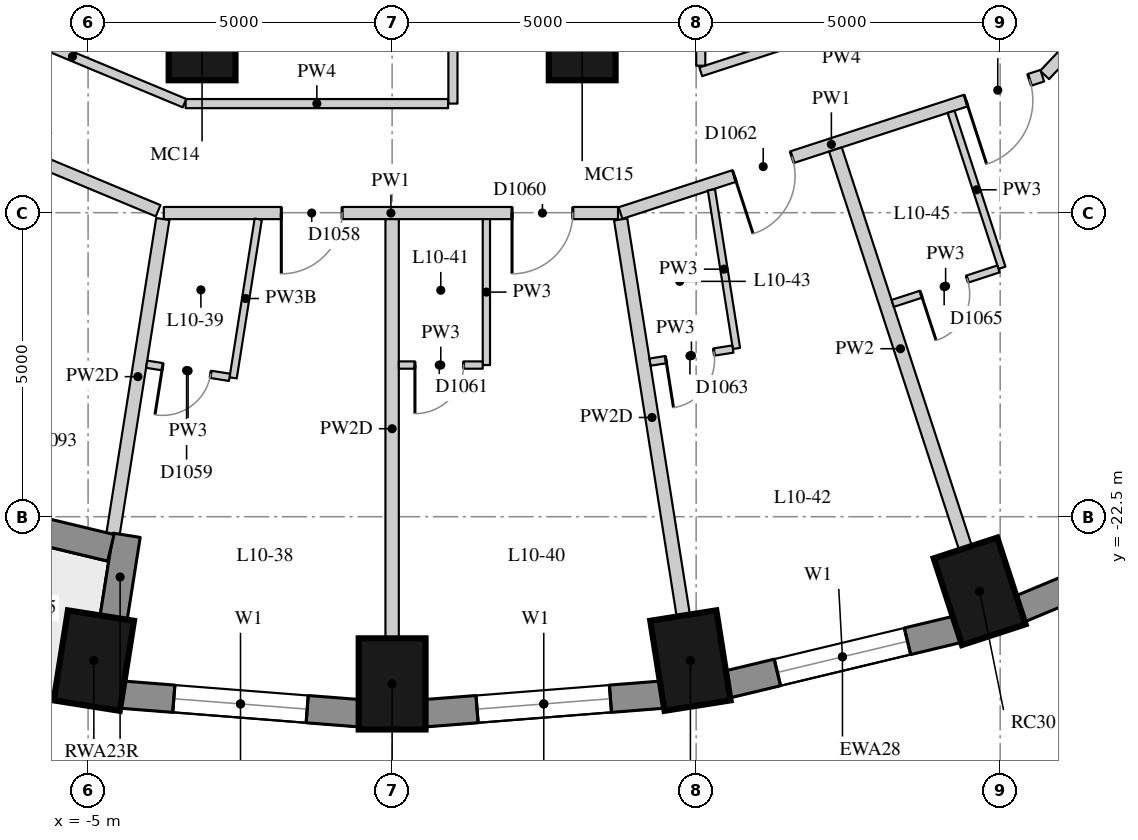
"""IFC4 building model, lengths in metres.
Left out: names, types, materials, properties, quantities, classifications, styles, units other than length and angle.
Written with IfcOpenShell. Run it as: python <this file> out.ifc"""

import sys

from ifc_helpers import new_model, si_unit, direction, frame, frame_2d, origin, origin_2d, place, context, subcontext, project, spatial, rectangle, extrude, element, fill, save


model = new_model("IFC4")
c1 = context("Model", 3, precision=1e-05, world=origin(), true_north=direction((0.0, 1.0)))
c2 = subcontext(c1, "Body", "Model", "MODEL_VIEW")
j1 = project(units=[si_unit("LENGTHUNIT", "METRE"), si_unit("PLANEANGLEUNIT", "RADIAN")], contexts=[c1])
p1 = place(None, origin())
s1 = spatial("IfcSite", under=j1, at=p1, CompositionType="ELEMENT")
p2 = place(p1, origin())
s2 = spatial("IfcBuilding", under=s1, at=p2, CompositionType="ELEMENT")
p3 = place(p2, frame((0.0, 0.0, 41.5)))
s3 = spatial("IfcBuildingStorey", under=s2, at=p3, CompositionType="ELEMENT", Elevation=41.5)
for number, where, z_axis, x_axis in (
    (1, (-4.906, -24.866, 0.0), (0.0, 0.0, 1.0), (-0.156, -0.988, 0.0)),
    (2, (0.0, -25.25, 0.0), (0.0, 0.0, 1.0), (0.0, -1.0, 0.0)),
    (3, (4.906, -24.866, 0.0), (0.0, 0.0, 1.0), (0.156, -0.988, 0.0)),
    (4, (9.662, -23.727, 0.0), (0.0, 0.0, 1.0), (0.31, -0.951, 0.0)),
):
    element("IfcColumn", number, at=place(p3, frame(where, z_axis=z_axis, x_axis=x_axis)), inside=s3, PredefinedType="COLUMN", context=c2, shape_type="SweptSolid", body=[
        extrude(rectangle(XDim=1.5, YDim=1.1, at=origin_2d()), origin(), (0.0, 0.0, 1.0), 3.3),
    ])
for number, where, z_axis, x_axis in (
    (5, (-3.126, -14.772, 0.0), (0.0, 0.0, 1.0), (1.0, 0.0, 0.0)),
    (6, (3.126, -14.772, 0.0), (0.0, 0.0, 1.0), (1.0, 0.0, 0.0)),
):
    element("IfcColumn", number, at=place(p3, frame(where, z_axis=z_axis, x_axis=x_axis)), inside=s3, PredefinedType="COLUMN", context=c2, shape_type="SweptSolid", body=[
        extrude(rectangle(XDim=1.1, YDim=1.1, at=origin_2d()), origin(), (0.0, 0.0, 1.0), 3.3),
    ])
p4 = place(p3, frame((-4.457, -25.426, 0.0), z_axis=(0.0, 0.0, 1.0), x_axis=(0.996955972145, -0.077966592873, 0.0)))
e7 = element("IfcWall", 7, at=p4, inside=s3, PredefinedType="SOLIDWALL", context=c2, shape_type="SweptSolid", body=[
    extrude(rectangle(XDim=3.939, YDim=0.45, at=frame_2d((1.97, 0.0))), origin(), (0.0, 0.0, 1.0), 3.02),
])
p5 = place(p4, frame((0.87, 0.0, 0.4)))
e8 = element("IfcOpeningElement", 8, at=p5, cuts=e7, PredefinedType="OPENING", context=c2, shape_type="SweptSolid", body=[
    extrude(rectangle(XDim=2.2, YDim=1.75, at=frame_2d((1.1, 0.875))), frame((0.0, 0.235, 0.0), z_axis=(0.0, -1.0, 0.0), x_axis=(1.0, 0.0, 0.0)), (0.0, 0.0, 1.0), 0.47),
])
p6 = place(p3, frame((0.53, -25.733, 0.0), z_axis=(0.0, 0.0, 1.0), x_axis=(0.996955972145, 0.077966592873, 0.0)))
e9 = element("IfcWall", 9, at=p6, inside=s3, PredefinedType="SOLIDWALL", context=c2, shape_type="SweptSolid", body=[
    extrude(rectangle(XDim=3.939, YDim=0.45, at=frame_2d((1.97, 0.0))), origin(), (0.0, 0.0, 1.0), 3.02),
])
p7 = place(p6, frame((0.87, 0.0, 0.4)))
e10 = element("IfcOpeningElement", 10, at=p7, cuts=e9, PredefinedType="OPENING", context=c2, shape_type="SweptSolid", body=[
    extrude(rectangle(XDim=2.2, YDim=1.75, at=frame_2d((1.1, 0.875))), frame((0.0, 0.235, 0.0), z_axis=(0.0, -1.0, 0.0), x_axis=(1.0, 0.0, 0.0)), (0.0, 0.0, 1.0), 0.47),
])
p8 = place(p3, frame((5.504, -25.26, 0.0), z_axis=(0.0, 0.0, 1.0), x_axis=(0.972496561493, 0.232917233979, 0.0)))
e11 = element("IfcWall", 11, at=p8, inside=s3, PredefinedType="SOLIDWALL", context=c2, shape_type="SweptSolid", body=[
    extrude(rectangle(XDim=3.911, YDim=0.45, at=frame_2d((1.956, 0.0))), origin(), (0.0, 0.0, 1.0), 3.02),
])
p9 = place(p8, frame((0.855, 0.0, 0.4)))
e12 = element("IfcOpeningElement", 12, at=p9, cuts=e11, PredefinedType="OPENING", context=c2, shape_type="SweptSolid", body=[
    extrude(rectangle(XDim=2.2, YDim=1.75, at=frame_2d((1.1, 0.875))), frame((0.0, 0.235, 0.0), z_axis=(0.0, -1.0, 0.0), x_axis=(1.0, 0.0, 0.0)), (0.0, 0.0, 1.0), 0.47),
])
p10 = place(p3, frame((10.315, -24.021, 0.0), z_axis=(0.0, 0.0, 1.0), x_axis=(0.923031964282, 0.384723267966, 0.0)))
e13 = element("IfcWall", 13, at=p10, inside=s3, PredefinedType="SOLIDWALL", context=c2, shape_type="SweptSolid", body=[
    extrude(rectangle(XDim=3.856, YDim=0.45, at=frame_2d((1.928, 0.0))), origin(), (0.0, 0.0, 1.0), 3.02),
])
p11 = place(p10, frame((0.828, 0.0, 0.4)))
e14 = element("IfcOpeningElement", 14, at=p11, cuts=e13, PredefinedType="OPENING", context=c2, shape_type="SweptSolid", body=[
    extrude(rectangle(XDim=2.2, YDim=1.75, at=frame_2d((1.1, 0.875))), frame((0.0, 0.235, 0.0), z_axis=(0.0, -1.0, 0.0), x_axis=(1.0, 0.0, 0.0)), (0.0, 0.0, 1.0), 0.47),
])
p12 = place(p3, frame((-4.583, -24.178, 0.0), z_axis=(0.0, 0.0, 1.0), x_axis=(0.156133927791, 0.98773589415, 0.0)))
e15 = element("IfcWall", 15, at=p12, inside=s3, PredefinedType="SOLIDWALL", context=c2, shape_type="SweptSolid", body=[
    extrude(rectangle(XDim=1.39, YDim=0.45, at=frame_2d((0.695, 0.0))), origin(), (0.0, 0.0, 1.0), 2.47),
])
p13 = place(p3, frame((-9.122, -21.932, 0.0), z_axis=(0.0, 0.0, 1.0), x_axis=(0.972346547441, -0.233542697764, 0.0)))
e16 = element("IfcWall", 16, at=p13, inside=s3, PredefinedType="SOLIDWALL", context=c2, shape_type="SweptSolid", body=[
    extrude(rectangle(XDim=4.624, YDim=0.45, at=frame_2d((2.312, 0.0))), origin(), (0.0, 0.0, 1.0), 3.02),
])
p14 = place(p13, frame((1.237, 0.0, 0.4)))
e17 = element("IfcOpeningElement", 17, at=p14, cuts=e16, PredefinedType="OPENING", context=c2, shape_type="SweptSolid", body=[
    extrude(rectangle(XDim=1.0, YDim=1.75, at=frame_2d((0.5, 0.875))), frame((0.0, 0.235, 0.0), z_axis=(0.0, -1.0, 0.0), x_axis=(1.0, 0.0, 0.0)), (0.0, 0.0, 1.0), 0.47),
])
p15 = place(p13, frame((2.387, 0.0, 0.0)))
e18 = element("IfcOpeningElement", 18, at=p15, cuts=e16, PredefinedType="OPENING", context=c2, shape_type="SweptSolid", body=[
    extrude(rectangle(XDim=1.0, YDim=2.15, at=frame_2d((0.5, 1.075))), frame((0.0, 0.235, 0.0), z_axis=(0.0, -1.0, 0.0), x_axis=(1.0, 0.0, 0.0)), (0.0, 0.0, 1.0), 0.47),
])
p16 = place(p3, frame((12.034, -13.858, 0.0), z_axis=(0.0, 0.0, 1.0), x_axis=(-0.687458821662, -0.726223359938, 0.0)))
e19 = element("IfcWall", 19, at=p16, inside=s3, PredefinedType="PARTITIONING", context=c2, shape_type="SweptSolid", body=[
    extrude(rectangle(XDim=1.896, YDim=0.2, at=frame_2d((0.948, 0.0))), origin(), (0.0, 0.0, 1.0), 3.02),
])
p17 = place(p3, frame((10.692, -15.247, 0.0), z_axis=(0.0, 0.0, 1.0), x_axis=(-0.950852414815, -0.309644449718, 0.0)))
e20 = element("IfcWall", 20, at=p17, inside=s3, PredefinedType="PARTITIONING", context=c2, shape_type="SweptSolid", body=[
    extrude(rectangle(XDim=7.296, YDim=0.2, at=frame_2d((3.648, 0.0))), origin(), (0.0, 0.0, 1.0), 3.02),
])
p18 = place(p17, frame((4.327, 0.0, 0.0)))
e21 = element("IfcOpeningElement", 21, at=p18, cuts=e20, PredefinedType="OPENING", context=c2, shape_type="SweptSolid", body=[
    extrude(rectangle(XDim=1.0, YDim=2.1, at=frame_2d((0.5, 1.05))), frame((0.0, 0.11, 0.0), z_axis=(0.0, -1.0, 0.0), x_axis=(1.0, 0.0, 0.0)), (0.0, 0.0, 1.0), 0.22),
])
p19 = place(p17, frame((0.22, 0.0, 0.0)))
e22 = element("IfcOpeningElement", 22, at=p19, cuts=e20, PredefinedType="OPENING", context=c2, shape_type="SweptSolid", body=[
    extrude(rectangle(XDim=1.1, YDim=2.1, at=frame_2d((0.55, 1.05))), frame((0.0, 0.11, 0.0), z_axis=(0.0, -1.0, 0.0), x_axis=(1.0, 0.0, 0.0)), (0.0, 0.0, 1.0), 0.22),
])
p20 = place(p3, frame((3.715, -17.506, 0.0), z_axis=(0.0, 0.0, 1.0), x_axis=(-1.0, 0.0, 0.0)))
e23 = element("IfcWall", 23, at=p20, inside=s3, PredefinedType="PARTITIONING", context=c2, shape_type="SweptSolid", body=[
    extrude(rectangle(XDim=7.471, YDim=0.2, at=frame_2d((3.735, 0.0))), origin(), (0.0, 0.0, 1.0), 3.02),
])
p21 = place(p20, frame((4.538, 0.0, 0.0)))
e24 = element("IfcOpeningElement", 24, at=p21, cuts=e23, PredefinedType="OPENING", context=c2, shape_type="SweptSolid", body=[
    extrude(rectangle(XDim=1.0, YDim=2.1, at=frame_2d((0.5, 1.05))), frame((0.0, 0.11, 0.0), z_axis=(0.0, -1.0, 0.0), x_axis=(1.0, 0.0, 0.0)), (0.0, 0.0, 1.0), 0.22),
])
p22 = place(p20, frame((0.743, 0.0, 0.0)))
e25 = element("IfcOpeningElement", 25, at=p22, cuts=e23, PredefinedType="OPENING", context=c2, shape_type="SweptSolid", body=[
    extrude(rectangle(XDim=1.0, YDim=2.1, at=frame_2d((0.5, 1.05))), frame((0.0, 0.11, 0.0), z_axis=(0.0, -1.0, 0.0), x_axis=(1.0, 0.0, 0.0)), (0.0, 0.0, 1.0), 0.22),
])
p23 = place(p3, frame((-3.848, -17.468, 0.0), z_axis=(0.0, 0.0, 1.0), x_axis=(-0.923248226412, 0.384203998454, 0.0)))
e26 = element("IfcWall", 26, at=p23, inside=s3, PredefinedType="PARTITIONING", context=c2, shape_type="SweptSolid", body=[
    extrude(rectangle(XDim=4.341, YDim=0.2, at=frame_2d((2.17, 0.0))), origin(), (0.0, 0.0, 1.0), 3.02),
])
p24 = place(p3, frame((1.0, -9.15, 0.0), z_axis=(0.0, 0.0, 1.0), x_axis=(0.0, -1.0, 0.0)))
e27 = element("IfcWall", 27, at=p24, inside=s3, PredefinedType="PARTITIONING", context=c2, shape_type="SweptSolid", body=[
    extrude(rectangle(XDim=6.556, YDim=0.15, at=frame_2d((3.278, 0.0))), origin(), (0.0, 0.0, 1.0), 2.47),
])
p25 = place(p24, frame((2.828, 0.0, 0.0)))
e28 = element("IfcOpeningElement", 28, at=p25, cuts=e27, PredefinedType="OPENING", context=c2, shape_type="SweptSolid", body=[
    extrude(rectangle(XDim=0.9, YDim=2.1, at=frame_2d((0.45, 1.05))), frame((0.0, 0.085, 0.0), z_axis=(0.0, -1.0, 0.0), x_axis=(1.0, 0.0, 0.0)), (0.0, 0.0, 1.0), 0.17),
])
p26 = place(p3, frame((0.92, -15.706, 0.0), z_axis=(0.0, 0.0, 1.0), x_axis=(-1.0, 0.0, 0.0)))
e29 = element("IfcWall", 29, at=p26, inside=s3, PredefinedType="PARTITIONING", context=c2, shape_type="SweptSolid", body=[
    extrude(rectangle(XDim=4.316, YDim=0.15, at=frame_2d((2.158, 0.0))), origin(), (0.0, 0.0, 1.0), 3.02),
])
p27 = place(p3, frame((-3.415, -15.698, 0.0), z_axis=(0.0, 0.0, 1.0), x_axis=(-0.923293917367, 0.38409418396, 0.0)))
e30 = element("IfcWall", 30, at=p27, inside=s3, PredefinedType="PARTITIONING", context=c2, shape_type="SweptSolid", body=[
    extrude(rectangle(XDim=3.992, YDim=0.15, at=frame_2d((1.996, 0.0))), origin(), (0.0, 0.0, 1.0), 2.57),
])
p28 = place(p3, frame((9.7, -13.677, 0.0), z_axis=(0.0, 0.0, 1.0), x_axis=(-0.950854246358, -0.309638825381, 0.0)))
e31 = element("IfcWall", 31, at=p28, inside=s3, PredefinedType="PARTITIONING", context=c2, shape_type="SweptSolid", body=[
    extrude(rectangle(XDim=4.863, YDim=0.15, at=frame_2d((2.432, 0.0))), origin(), (0.0, 0.0, 1.0), 3.02),
])
p29 = place(p28, frame((1.878, 0.0, 0.0)))
e32 = element("IfcOpeningElement", 32, at=p29, cuts=e31, PredefinedType="OPENING", context=c2, shape_type="SweptSolid", body=[
    extrude(rectangle(XDim=0.9, YDim=2.1, at=frame_2d((0.45, 1.05))), frame((0.0, 0.085, 0.0), z_axis=(0.0, -1.0, 0.0), x_axis=(1.0, 0.0, 0.0)), (0.0, 0.0, 1.0), 0.17),
])
p30 = place(p3, frame((5.076, -15.083, 0.0), z_axis=(0.0, 0.0, 1.0), x_axis=(0.0, 1.0, 0.0)))
e33 = element("IfcWall", 33, at=p30, inside=s3, PredefinedType="PARTITIONING", context=c2, shape_type="SweptSolid", body=[
    extrude(rectangle(XDim=0.86, YDim=0.15, at=frame_2d((0.43, 0.0))), origin(), (0.0, 0.0, 1.0), 3.02),
])
p31 = place(p3, frame((-4.591, -22.789, 0.0), z_axis=(0.0, 0.0, 1.0), x_axis=(0.156110671429, 0.987739570062, 0.0)))
e34 = element("IfcWall", 34, at=p31, inside=s3, PredefinedType="PARTITIONING", context=c2, shape_type="SweptSolid", body=[
    extrude(rectangle(XDim=5.249, YDim=0.22, at=frame_2d((2.624, 0.0))), origin(), (0.0, 0.0, 1.0), 2.47),
])
p32 = place(p3, frame((0.0, -24.5, 0.0), z_axis=(0.0, 0.0, 1.0), x_axis=(0.0, 1.0, 0.0)))
e35 = element("IfcWall", 35, at=p32, inside=s3, PredefinedType="PARTITIONING", context=c2, shape_type="SweptSolid", body=[
    extrude(rectangle(XDim=6.894, YDim=0.22, at=frame_2d((3.447, 0.0))), origin(), (0.0, 0.0, 1.0), 2.47),
])
p33 = place(p3, frame((4.788, -24.125, 0.0), z_axis=(0.0, 0.0, 1.0), x_axis=(-0.156122228938, 0.987737743347, 0.0)))
e36 = element("IfcWall", 36, at=p33, inside=s3, PredefinedType="PARTITIONING", context=c2, shape_type="SweptSolid", body=[
    extrude(rectangle(XDim=6.596, YDim=0.22, at=frame_2d((3.298, 0.0))), origin(), (0.0, 0.0, 1.0), 2.47),
])
p34 = place(p3, frame((9.429, -23.014, 0.0), z_axis=(0.0, 0.0, 1.0), x_axis=(-0.310230029144, 0.950661521793, 0.0)))
e37 = element("IfcWall", 37, at=p34, inside=s3, PredefinedType="PARTITIONING", context=c2, shape_type="SweptSolid", body=[
    extrude(rectangle(XDim=6.895, YDim=0.22, at=frame_2d((3.447, 0.0))), origin(), (0.0, 0.0, 1.0), 3.02),
])
p35 = place(p3, frame((-2.202, -17.606, 0.0), z_axis=(0.0, 0.0, 1.0), x_axis=(-0.156156996107, -0.987732247407, 0.0)))
e38 = element("IfcWall", 38, at=p35, inside=s3, PredefinedType="PARTITIONING", context=c2, shape_type="SweptSolid", body=[
    extrude(rectangle(XDim=2.644, YDim=0.12, at=frame_2d((1.322, 0.0))), origin(), (0.0, 0.0, 1.0), 2.47),
])
p36 = place(p3, frame((1.55, -17.606, 0.0), z_axis=(0.0, 0.0, 1.0), x_axis=(0.0, -1.0, 0.0)))
e39 = element("IfcWall", 39, at=p36, inside=s3, PredefinedType="PARTITIONING", context=c2, shape_type="SweptSolid", body=[
    extrude(rectangle(XDim=2.4, YDim=0.12, at=frame_2d((1.2, 0.0))), origin(), (0.0, 0.0, 1.0), 3.02),
])
p37 = place(p3, frame((5.251, -17.124, 0.0), z_axis=(0.0, 0.0, 1.0), x_axis=(0.156104955519, -0.987740473435, 0.0)))
e40 = element("IfcWall", 40, at=p37, inside=s3, PredefinedType="PARTITIONING", context=c2, shape_type="SweptSolid", body=[
    extrude(rectangle(XDim=2.642, YDim=0.12, at=frame_2d((1.321, 0.0))), origin(), (0.0, 0.0, 1.0), 3.02),
])
p38 = place(p3, frame((9.192, -15.84, 0.0), z_axis=(0.0, 0.0, 1.0), x_axis=(0.310278328391, -0.950645758909, 0.0)))
e41 = element("IfcWall", 41, at=p38, inside=s3, PredefinedType="PARTITIONING", context=c2, shape_type="SweptSolid", body=[
    extrude(rectangle(XDim=2.699, YDim=0.12, at=frame_2d((1.35, 0.0))), origin(), (0.0, 0.0, 1.0), 3.02),
])
p39 = place(p3, frame((-2.674, -20.208, 0.0), z_axis=(0.0, 0.0, 1.0), x_axis=(-0.987695455518, 0.156389536571, 0.0)))
e42 = element("IfcWall", 42, at=p39, inside=s3, PredefinedType="PARTITIONING", context=c2, shape_type="SweptSolid", body=[
    extrude(rectangle(XDim=1.38, YDim=0.12, at=frame_2d((0.69, 0.0))), origin(), (0.0, 0.0, 1.0), 3.02),
])
p40 = place(p39, frame((0.315, 0.0, 0.0)))
e43 = element("IfcOpeningElement", 43, at=p40, cuts=e42, PredefinedType="OPENING", context=c2, shape_type="SweptSolid", body=[
    extrude(rectangle(XDim=0.8, YDim=2.1, at=frame_2d((0.4, 1.05))), frame((0.0, 0.07, 0.0), z_axis=(0.0, -1.0, 0.0), x_axis=(1.0, 0.0, 0.0)), (0.0, 0.0, 1.0), 0.14),
])
p41 = place(p3, frame((1.49, -20.006, 0.0), z_axis=(0.0, 0.0, 1.0), x_axis=(-1.0, 0.0, 0.0)))
e44 = element("IfcWall", 44, at=p41, inside=s3, PredefinedType="PARTITIONING", context=c2, shape_type="SweptSolid", body=[
    extrude(rectangle(XDim=1.38, YDim=0.12, at=frame_2d((0.69, 0.0))), origin(), (0.0, 0.0, 1.0), 3.02),
])
p42 = place(p41, frame((0.315, 0.0, 0.0)))
e45 = element("IfcOpeningElement", 45, at=p42, cuts=e44, PredefinedType="OPENING", context=c2, shape_type="SweptSolid", body=[
    extrude(rectangle(XDim=0.8, YDim=2.1, at=frame_2d((0.4, 1.05))), frame((0.0, 0.07, 0.0), z_axis=(0.0, -1.0, 0.0), x_axis=(1.0, 0.0, 0.0)), (0.0, 0.0, 1.0), 0.14),
])
p43 = place(p3, frame((5.604, -19.742, 0.0), z_axis=(0.0, 0.0, 1.0), x_axis=(-0.987722767831, -0.156216945011, 0.0)))
e46 = element("IfcWall", 46, at=p43, inside=s3, PredefinedType="PARTITIONING", context=c2, shape_type="SweptSolid", body=[
    extrude(rectangle(XDim=1.38, YDim=0.12, at=frame_2d((0.69, 0.0))), origin(), (0.0, 0.0, 1.0), 3.02),
])
p44 = place(p43, frame((0.315, 0.0, 0.0)))
e47 = element("IfcOpeningElement", 47, at=p44, cuts=e46, PredefinedType="OPENING", context=c2, shape_type="SweptSolid", body=[
    extrude(rectangle(XDim=0.8, YDim=2.1, at=frame_2d((0.4, 1.05))), frame((0.0, 0.07, 0.0), z_axis=(0.0, -1.0, 0.0), x_axis=(1.0, 0.0, 0.0)), (0.0, 0.0, 1.0), 0.14),
])
p45 = place(p3, frame((9.972, -18.425, 0.0), z_axis=(0.0, 0.0, 1.0), x_axis=(-0.950678536911, -0.31017788357, 0.0)))
e48 = element("IfcWall", 48, at=p45, inside=s3, PredefinedType="PARTITIONING", context=c2, shape_type="SweptSolid", body=[
    extrude(rectangle(XDim=1.83, YDim=0.12, at=frame_2d((0.915, 0.0))), origin(), (0.0, 0.0, 1.0), 3.02),
])
p46 = place(p45, frame((0.54, 0.0, 0.0)))
e49 = element("IfcOpeningElement", 49, at=p46, cuts=e48, PredefinedType="OPENING", context=c2, shape_type="SweptSolid", body=[
    extrude(rectangle(XDim=0.8, YDim=2.1, at=frame_2d((0.4, 1.05))), frame((0.0, 0.07, 0.0), z_axis=(0.0, -1.0, 0.0), x_axis=(1.0, 0.0, 0.0)), (0.0, 0.0, 1.0), 0.14),
])
p47 = place(p5, origin())
e50 = element("IfcWindow", 50, at=p47, inside=s3, PartitioningType="SINGLE_PANEL", PredefinedType="WINDOW", context=c2, shape_type="SweptSolid", body=[
    extrude(rectangle(XDim=2.2, YDim=1.75, at=frame_2d((1.1, 0.875))), frame((0.0, 0.035, 0.0), z_axis=(0.0, -1.0, 0.0), x_axis=(1.0, 0.0, 0.0)), (0.0, 0.0, 1.0), 0.06),
])
fill(e8, e50)
p48 = place(p7, origin())
e51 = element("IfcWindow", 51, at=p48, inside=s3, PartitioningType="SINGLE_PANEL", PredefinedType="WINDOW", context=c2, shape_type="SweptSolid", body=[
    extrude(rectangle(XDim=2.2, YDim=1.75, at=frame_2d((1.1, 0.875))), frame((0.0, 0.035, 0.0), z_axis=(0.0, -1.0, 0.0), x_axis=(1.0, 0.0, 0.0)), (0.0, 0.0, 1.0), 0.06),
])
fill(e10, e51)
p49 = place(p9, origin())
e52 = element("IfcWindow", 52, at=p49, inside=s3, PartitioningType="SINGLE_PANEL", PredefinedType="WINDOW", context=c2, shape_type="SweptSolid", body=[
    extrude(rectangle(XDim=2.2, YDim=1.75, at=frame_2d((1.1, 0.875))), frame((0.0, 0.035, 0.0), z_axis=(0.0, -1.0, 0.0), x_axis=(1.0, 0.0, 0.0)), (0.0, 0.0, 1.0), 0.06),
])
fill(e12, e52)
p50 = place(p21, origin())
e53 = element("IfcDoor", 53, at=p50, inside=s3, OperationType="SINGLE_SWING_RIGHT", PredefinedType="DOOR", context=c2, shape_type="SweptSolid", body=[
    extrude(rectangle(XDim=1.0, YDim=2.1, at=frame_2d((0.5, 1.05))), frame((0.0, 0.025, 0.0), z_axis=(0.0, -1.0, 0.0), x_axis=(1.0, 0.0, 0.0)), (0.0, 0.0, 1.0), 0.05),
])
fill(e24, e53)
p51 = place(p40, origin())
e54 = element("IfcDoor", 54, at=p51, inside=s3, OperationType="SINGLE_SWING_RIGHT", PredefinedType="DOOR", context=c2, shape_type="SweptSolid", body=[
    extrude(rectangle(XDim=0.8, YDim=2.1, at=frame_2d((0.4, 1.05))), frame((0.0, 0.025, 0.0), z_axis=(0.0, -1.0, 0.0), x_axis=(1.0, 0.0, 0.0)), (0.0, 0.0, 1.0), 0.05),
])
fill(e43, e54)
p52 = place(p22, origin())
e55 = element("IfcDoor", 55, at=p52, inside=s3, OperationType="SINGLE_SWING_RIGHT", PredefinedType="DOOR", context=c2, shape_type="SweptSolid", body=[
    extrude(rectangle(XDim=1.0, YDim=2.1, at=frame_2d((0.5, 1.05))), frame((0.0, 0.025, 0.0), z_axis=(0.0, -1.0, 0.0), x_axis=(1.0, 0.0, 0.0)), (0.0, 0.0, 1.0), 0.05),
])
fill(e25, e55)
p53 = place(p42, origin())
e56 = element("IfcDoor", 56, at=p53, inside=s3, OperationType="SINGLE_SWING_RIGHT", PredefinedType="DOOR", context=c2, shape_type="SweptSolid", body=[
    extrude(rectangle(XDim=0.8, YDim=2.1, at=frame_2d((0.4, 1.05))), frame((0.0, 0.025, 0.0), z_axis=(0.0, -1.0, 0.0), x_axis=(1.0, 0.0, 0.0)), (0.0, 0.0, 1.0), 0.05),
])
fill(e45, e56)
p54 = place(p18, origin())
e57 = element("IfcDoor", 57, at=p54, inside=s3, OperationType="SINGLE_SWING_RIGHT", PredefinedType="DOOR", context=c2, shape_type="SweptSolid", body=[
    extrude(rectangle(XDim=1.0, YDim=2.1, at=frame_2d((0.5, 1.05))), frame((0.0, 0.025, 0.0), z_axis=(0.0, -1.0, 0.0), x_axis=(1.0, 0.0, 0.0)), (0.0, 0.0, 1.0), 0.05),
])
fill(e21, e57)
p55 = place(p44, origin())
e58 = element("IfcDoor", 58, at=p55, inside=s3, OperationType="SINGLE_SWING_RIGHT", PredefinedType="DOOR", context=c2, shape_type="SweptSolid", body=[
    extrude(rectangle(XDim=0.8, YDim=2.1, at=frame_2d((0.4, 1.05))), frame((0.0, 0.025, 0.0), z_axis=(0.0, -1.0, 0.0), x_axis=(1.0, 0.0, 0.0)), (0.0, 0.0, 1.0), 0.05),
])
fill(e47, e58)
p56 = place(p19, origin())
e59 = element("IfcDoor", 59, at=p56, inside=s3, OperationType="SINGLE_SWING_RIGHT", PredefinedType="DOOR", context=c2, shape_type="SweptSolid", body=[
    extrude(rectangle(XDim=1.1, YDim=2.1, at=frame_2d((0.55, 1.05))), frame((0.0, 0.025, 0.0), z_axis=(0.0, -1.0, 0.0), x_axis=(1.0, 0.0, 0.0)), (0.0, 0.0, 1.0), 0.05),
])
fill(e22, e59)
p57 = place(p46, origin())
e60 = element("IfcDoor", 60, at=p57, inside=s3, OperationType="SINGLE_SWING_RIGHT", PredefinedType="DOOR", context=c2, shape_type="SweptSolid", body=[
    extrude(rectangle(XDim=0.8, YDim=2.1, at=frame_2d((0.4, 1.05))), frame((0.0, 0.025, 0.0), z_axis=(0.0, -1.0, 0.0), x_axis=(1.0, 0.0, 0.0)), (0.0, 0.0, 1.0), 0.05),
])
fill(e49, e60)
save(model, sys.argv[1])
